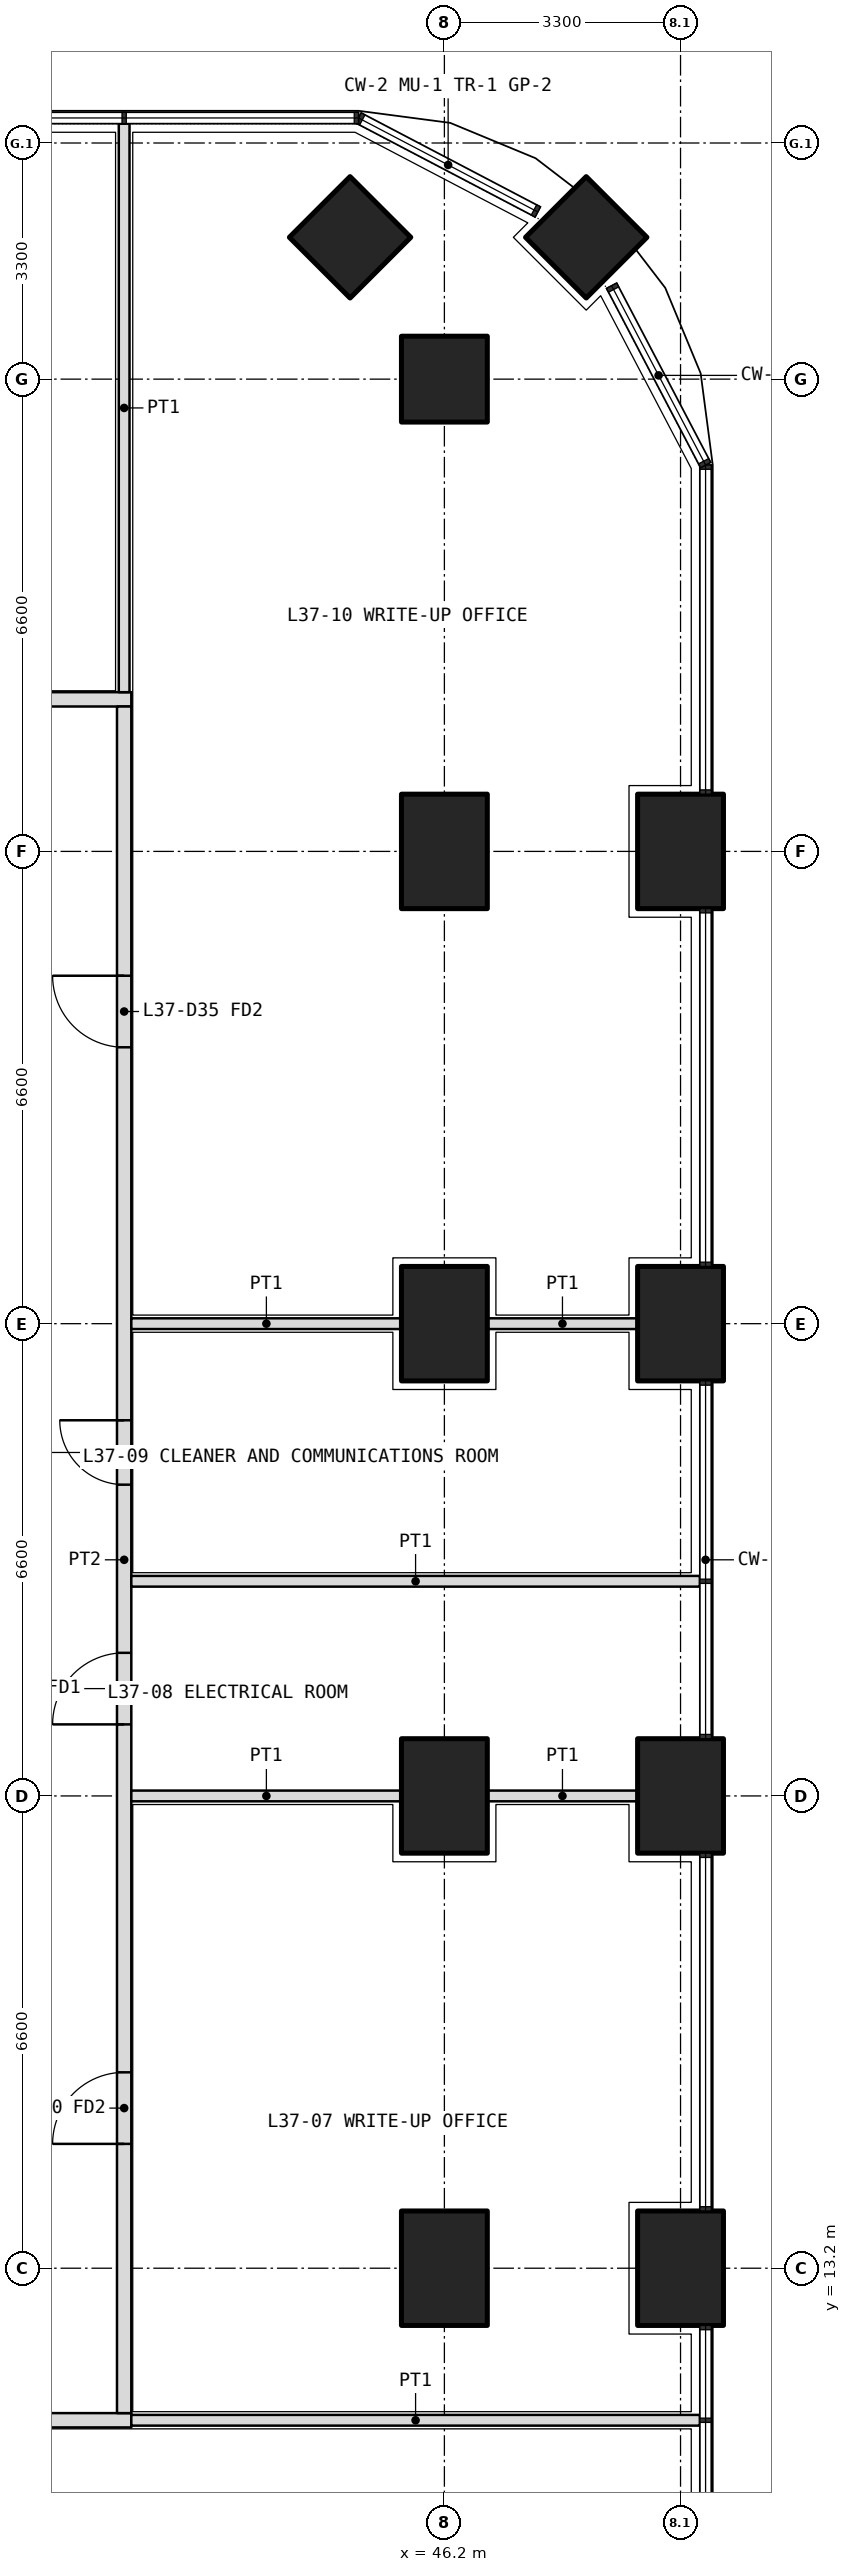
"""IFC4 building model, lengths in metres.
Left out: names, types, materials, properties, quantities, classifications, styles, units other than length and angle.
Written with IfcOpenShell. Run it as: python <this file> out.ifc"""

import sys

from ifc_helpers import new_model, si_unit, direction, frame, frame_2d, origin, origin_2d, place, context, subcontext, project, spatial, rectangle, extrude, element, fill, save


model = new_model("IFC4")
c1 = context("Model", 3, precision=1e-05, world=origin(), true_north=direction((0.0, 1.0)))
c2 = subcontext(c1, "Body", "Model", "MODEL_VIEW")
j1 = project(units=[si_unit("LENGTHUNIT", "METRE"), si_unit("PLANEANGLEUNIT", "RADIAN")], contexts=[c1])
p1 = place(None, origin())
s1 = spatial("IfcSite", under=j1, at=p1, CompositionType="ELEMENT")
p2 = place(p1, origin())
s2 = spatial("IfcBuilding", under=s1, at=p2, CompositionType="ELEMENT")
p3 = place(p2, frame((0.0, 0.0, 164.1)))
s3 = spatial("IfcBuildingStorey", under=s2, at=p3, CompositionType="ELEMENT", Elevation=164.1)
p4 = place(p3, frame((48.182, 41.582, 0.0), z_axis=(0.0, 0.0, 1.0), x_axis=(0.707106781187, 0.707106781187, 0.0)))
e1 = element("IfcColumn", 1, at=p4, inside=s3, PredefinedType="COLUMN", context=c2, shape_type="SweptSolid", body=[
    extrude(rectangle(XDim=1.2, YDim=1.2, at=origin_2d()), origin(), (0.0, 0.0, 1.0), 4.2),
])
for number, where, z_axis, x_axis in (
    (2, (49.5, 13.2, 0.0), (0.0, 0.0, 1.0), (0.0, 1.0, 0.0)),
    (3, (49.5, 19.8, 0.0), (0.0, 0.0, 1.0), (0.0, 1.0, 0.0)),
    (4, (49.5, 26.4, 0.0), (0.0, 0.0, 1.0), (0.0, 1.0, 0.0)),
    (5, (49.5, 33.0, 0.0), (0.0, 0.0, 1.0), (0.0, 1.0, 0.0)),
):
    element("IfcColumn", number, at=place(p3, frame(where, z_axis=z_axis, x_axis=x_axis)), inside=s3, PredefinedType="COLUMN", context=c2, shape_type="SweptSolid", body=[
        extrude(rectangle(XDim=1.6, YDim=1.2, at=origin_2d()), origin(), (0.0, 0.0, 1.0), 4.2),
    ])
for number, where, z_axis, x_axis in (
    (6, (46.2, 39.6, 0.0), (0.0, 0.0, 1.0), (1.0, 0.0, 0.0)),
    (7, (44.882, 41.582, 0.0), (0.0, 0.0, 1.0), (0.707, 0.707, 0.0)),
):
    element("IfcColumn", number, at=place(p3, frame(where, z_axis=z_axis, x_axis=x_axis)), inside=s3, PredefinedType="COLUMN", context=c2, shape_type="SweptSolid", body=[
        extrude(rectangle(XDim=1.2, YDim=1.2, at=origin_2d()), origin(), (0.0, 0.0, 1.0), 4.2),
    ])
for number, where, z_axis, x_axis in (
    (8, (46.2, 13.2, 0.0), (0.0, 0.0, 1.0), (0.0, 1.0, 0.0)),
    (9, (46.2, 19.8, 0.0), (0.0, 0.0, 1.0), (0.0, 1.0, 0.0)),
    (10, (46.2, 26.4, 0.0), (0.0, 0.0, 1.0), (0.0, 1.0, 0.0)),
    (11, (46.2, 33.0, 0.0), (0.0, 0.0, 1.0), (0.0, 1.0, 0.0)),
):
    element("IfcColumn", number, at=place(p3, frame(where, z_axis=z_axis, x_axis=x_axis)), inside=s3, PredefinedType="COLUMN", context=c2, shape_type="SweptSolid", body=[
        extrude(rectangle(XDim=1.6, YDim=1.2, at=origin_2d()), origin(), (0.0, 0.0, 1.0), 4.2),
    ])
p5 = place(p3, frame((16.5, 11.075, 0.0), z_axis=(0.0, 0.0, 1.0), x_axis=(1.0, 0.0, 0.0)))
e12 = element("IfcWall", 12, at=p5, inside=s3, PredefinedType="PARTITIONING", context=c2, shape_type="SweptSolid", body=[
    extrude(rectangle(XDim=25.325, YDim=0.2, at=frame_2d((12.663, 0.0))), origin(), (0.0, 0.0, 1.0), 2.85),
])
p6 = place(p5, frame((1.6, 0.0, 0.0)))
e13 = element("IfcOpeningElement", 13, at=p6, cuts=e12, PredefinedType="OPENING", context=c2, shape_type="SweptSolid", body=[
    extrude(rectangle(XDim=1.0, YDim=2.1, at=frame_2d((0.5, 1.05))), frame((0.0, 0.11, 0.0), z_axis=(0.0, -1.0, 0.0), x_axis=(1.0, 0.0, 0.0)), (0.0, 0.0, 1.0), 0.22),
])
p7 = place(p5, frame((4.9, 0.0, 0.0)))
e14 = element("IfcOpeningElement", 14, at=p7, cuts=e12, PredefinedType="OPENING", context=c2, shape_type="SweptSolid", body=[
    extrude(rectangle(XDim=1.0, YDim=2.1, at=frame_2d((0.5, 1.05))), frame((0.0, 0.11, 0.0), z_axis=(0.0, -1.0, 0.0), x_axis=(1.0, 0.0, 0.0)), (0.0, 0.0, 1.0), 0.22),
])
p8 = place(p5, frame((7.65, 0.0, 0.0)))
e15 = element("IfcOpeningElement", 15, at=p8, cuts=e12, PredefinedType="OPENING", context=c2, shape_type="SweptSolid", body=[
    extrude(rectangle(XDim=1.2, YDim=2.1, at=frame_2d((0.6, 1.05))), frame((0.0, 0.11, 0.0), z_axis=(0.0, -1.0, 0.0), x_axis=(1.0, 0.0, 0.0)), (0.0, 0.0, 1.0), 0.22),
])
p9 = place(p5, frame((16.962, 0.0, 0.0)))
e16 = element("IfcOpeningElement", 16, at=p9, cuts=e12, PredefinedType="OPENING", context=c2, shape_type="SweptSolid", body=[
    extrude(rectangle(XDim=1.2, YDim=2.1, at=frame_2d((0.6, 1.05))), frame((0.0, 0.11, 0.0), z_axis=(0.0, -1.0, 0.0), x_axis=(1.0, 0.0, 0.0)), (0.0, 0.0, 1.0), 0.22),
])
p10 = place(p3, frame((10.975, 35.125, 0.0), z_axis=(0.0, 0.0, 1.0), x_axis=(1.0, 0.0, 0.0)))
e17 = element("IfcWall", 17, at=p10, inside=s3, PredefinedType="PARTITIONING", context=c2, shape_type="SweptSolid", body=[
    extrude(rectangle(XDim=30.85, YDim=0.2, at=frame_2d((15.425, 0.0))), origin(), (0.0, 0.0, 1.0), 2.85),
])
p11 = place(p10, frame((0.663, 0.0, 0.0)))
e18 = element("IfcOpeningElement", 18, at=p11, cuts=e17, PredefinedType="OPENING", context=c2, shape_type="SweptSolid", body=[
    extrude(rectangle(XDim=1.0, YDim=2.1, at=frame_2d((0.5, 1.05))), frame((0.0, 0.11, 0.0), z_axis=(0.0, -1.0, 0.0), x_axis=(1.0, 0.0, 0.0)), (0.0, 0.0, 1.0), 0.22),
])
p12 = place(p10, frame((3.275, 0.0, 0.0)))
e19 = element("IfcOpeningElement", 19, at=p12, cuts=e17, PredefinedType="OPENING", context=c2, shape_type="SweptSolid", body=[
    extrude(rectangle(XDim=1.2, YDim=2.1, at=frame_2d((0.6, 1.05))), frame((0.0, 0.11, 0.0), z_axis=(0.0, -1.0, 0.0), x_axis=(1.0, 0.0, 0.0)), (0.0, 0.0, 1.0), 0.22),
])
p13 = place(p10, frame((11.625, 0.0, 0.0)))
e20 = element("IfcOpeningElement", 20, at=p13, cuts=e17, PredefinedType="OPENING", context=c2, shape_type="SweptSolid", body=[
    extrude(rectangle(XDim=1.0, YDim=2.1, at=frame_2d((0.5, 1.05))), frame((0.0, 0.11, 0.0), z_axis=(0.0, -1.0, 0.0), x_axis=(1.0, 0.0, 0.0)), (0.0, 0.0, 1.0), 0.22),
])
p14 = place(p10, frame((24.137, 0.0, 0.0)))
e21 = element("IfcOpeningElement", 21, at=p14, cuts=e17, PredefinedType="OPENING", context=c2, shape_type="SweptSolid", body=[
    extrude(rectangle(XDim=1.2, YDim=2.1, at=frame_2d((0.6, 1.05))), frame((0.0, 0.11, 0.0), z_axis=(0.0, -1.0, 0.0), x_axis=(1.0, 0.0, 0.0)), (0.0, 0.0, 1.0), 0.22),
])
p15 = place(p3, frame((41.725, 11.175, 0.0), z_axis=(0.0, 0.0, 1.0), x_axis=(0.0, 1.0, 0.0)))
e22 = element("IfcWall", 22, at=p15, inside=s3, PredefinedType="PARTITIONING", context=c2, shape_type="SweptSolid", body=[
    extrude(rectangle(XDim=23.85, YDim=0.2, at=frame_2d((11.925, 0.0))), origin(), (0.0, 0.0, 1.0), 2.85),
])
p16 = place(p15, frame((3.762, 0.0, 0.0)))
e23 = element("IfcOpeningElement", 23, at=p16, cuts=e22, PredefinedType="OPENING", context=c2, shape_type="SweptSolid", body=[
    extrude(rectangle(XDim=1.0, YDim=2.1, at=frame_2d((0.5, 1.05))), frame((0.0, 0.11, 0.0), z_axis=(0.0, -1.0, 0.0), x_axis=(1.0, 0.0, 0.0)), (0.0, 0.0, 1.0), 0.22),
])
p17 = place(p15, frame((9.625, 0.0, 0.0)))
e24 = element("IfcOpeningElement", 24, at=p17, cuts=e22, PredefinedType="OPENING", context=c2, shape_type="SweptSolid", body=[
    extrude(rectangle(XDim=1.0, YDim=2.1, at=frame_2d((0.5, 1.05))), frame((0.0, 0.11, 0.0), z_axis=(0.0, -1.0, 0.0), x_axis=(1.0, 0.0, 0.0)), (0.0, 0.0, 1.0), 0.22),
])
p18 = place(p15, frame((12.975, 0.0, 0.0)))
e25 = element("IfcOpeningElement", 25, at=p18, cuts=e22, PredefinedType="OPENING", context=c2, shape_type="SweptSolid", body=[
    extrude(rectangle(XDim=0.9, YDim=2.1, at=frame_2d((0.45, 1.05))), frame((0.0, 0.11, 0.0), z_axis=(0.0, -1.0, 0.0), x_axis=(1.0, 0.0, 0.0)), (0.0, 0.0, 1.0), 0.22),
])
p19 = place(p15, frame((19.087, 0.0, 0.0)))
e26 = element("IfcOpeningElement", 26, at=p19, cuts=e22, PredefinedType="OPENING", context=c2, shape_type="SweptSolid", body=[
    extrude(rectangle(XDim=1.0, YDim=2.1, at=frame_2d((0.5, 1.05))), frame((0.0, 0.11, 0.0), z_axis=(0.0, -1.0, 0.0), x_axis=(1.0, 0.0, 0.0)), (0.0, 0.0, 1.0), 0.22),
])
p20 = place(p3, frame((49.77, 11.075, 0.0), z_axis=(0.0, 0.0, 1.0), x_axis=(-1.0, 0.0, 0.0)))
e27 = element("IfcWall", 27, at=p20, inside=s3, PredefinedType="PARTITIONING", context=c2, shape_type="SweptSolid", body=[
    extrude(rectangle(XDim=7.945, YDim=0.15, at=frame_2d((3.973, 0.0))), origin(), (0.0, 0.0, 1.0), 2.7),
])
p21 = place(p3, frame((41.725, 43.17, 0.0), z_axis=(0.0, 0.0, 1.0), x_axis=(0.0, -1.0, 0.0)))
e28 = element("IfcWall", 28, at=p21, inside=s3, PredefinedType="PARTITIONING", context=c2, shape_type="SweptSolid", body=[
    extrude(rectangle(XDim=7.945, YDim=0.15, at=frame_2d((3.972, 0.0))), origin(), (0.0, 0.0, 1.0), 2.7),
])
p22 = place(p3, frame((49.77, 22.8, 0.0), z_axis=(0.0, 0.0, 1.0), x_axis=(-1.0, 0.0, 0.0)))
e29 = element("IfcWall", 29, at=p22, inside=s3, PredefinedType="PARTITIONING", context=c2, shape_type="SweptSolid", body=[
    extrude(rectangle(XDim=7.945, YDim=0.15, at=frame_2d((3.973, 0.0))), origin(), (0.0, 0.0, 1.0), 2.7),
])
p23 = place(p3, frame((48.9, 26.4, 0.0), z_axis=(0.0, 0.0, 1.0), x_axis=(-1.0, 0.0, 0.0)))
e30 = element("IfcWall", 30, at=p23, inside=s3, PredefinedType="PARTITIONING", context=c2, shape_type="SweptSolid", body=[
    extrude(rectangle(XDim=2.1, YDim=0.15, at=frame_2d((1.05, 0.0))), origin(), (0.0, 0.0, 1.0), 2.85),
])
p24 = place(p3, frame((45.6, 26.4, 0.0), z_axis=(0.0, 0.0, 1.0), x_axis=(-1.0, 0.0, 0.0)))
e31 = element("IfcWall", 31, at=p24, inside=s3, PredefinedType="PARTITIONING", context=c2, shape_type="SweptSolid", body=[
    extrude(rectangle(XDim=3.775, YDim=0.15, at=frame_2d((1.888, 0.0))), origin(), (0.0, 0.0, 1.0), 2.85),
])
p25 = place(p3, frame((48.9, 19.8, 0.0), z_axis=(0.0, 0.0, 1.0), x_axis=(-1.0, 0.0, 0.0)))
e32 = element("IfcWall", 32, at=p25, inside=s3, PredefinedType="PARTITIONING", context=c2, shape_type="SweptSolid", body=[
    extrude(rectangle(XDim=2.1, YDim=0.15, at=frame_2d((1.05, 0.0))), origin(), (0.0, 0.0, 1.0), 2.85),
])
p26 = place(p3, frame((45.6, 19.8, 0.0), z_axis=(0.0, 0.0, 1.0), x_axis=(-1.0, 0.0, 0.0)))
e33 = element("IfcWall", 33, at=p26, inside=s3, PredefinedType="PARTITIONING", context=c2, shape_type="SweptSolid", body=[
    extrude(rectangle(XDim=3.775, YDim=0.15, at=frame_2d((1.888, 0.0))), origin(), (0.0, 0.0, 1.0), 2.85),
])
p27 = place(p16, origin())
e34 = element("IfcDoor", 34, at=p27, inside=s3, OperationType="SINGLE_SWING_LEFT", PredefinedType="DOOR", context=c2, shape_type="SweptSolid", body=[
    extrude(rectangle(XDim=1.0, YDim=2.1, at=frame_2d((0.5, 1.05))), frame((0.0, 0.025, 0.0), z_axis=(0.0, -1.0, 0.0), x_axis=(1.0, 0.0, 0.0)), (0.0, 0.0, 1.0), 0.05),
])
fill(e23, e34)
p28 = place(p17, origin())
e35 = element("IfcDoor", 35, at=p28, inside=s3, OperationType="SINGLE_SWING_LEFT", PredefinedType="DOOR", context=c2, shape_type="SweptSolid", body=[
    extrude(rectangle(XDim=1.0, YDim=2.1, at=frame_2d((0.5, 1.05))), frame((0.0, 0.025, 0.0), z_axis=(0.0, -1.0, 0.0), x_axis=(1.0, 0.0, 0.0)), (0.0, 0.0, 1.0), 0.05),
])
fill(e24, e35)
p29 = place(p18, origin())
e36 = element("IfcDoor", 36, at=p29, inside=s3, OperationType="SINGLE_SWING_RIGHT", PredefinedType="DOOR", context=c2, shape_type="SweptSolid", body=[
    extrude(rectangle(XDim=0.9, YDim=2.1, at=frame_2d((0.45, 1.05))), frame((0.0, 0.025, 0.0), z_axis=(0.0, -1.0, 0.0), x_axis=(1.0, 0.0, 0.0)), (0.0, 0.0, 1.0), 0.05),
])
fill(e25, e36)
p30 = place(p19, origin())
e37 = element("IfcDoor", 37, at=p30, inside=s3, OperationType="SINGLE_SWING_RIGHT", PredefinedType="DOOR", context=c2, shape_type="SweptSolid", body=[
    extrude(rectangle(XDim=1.0, YDim=2.1, at=frame_2d((0.5, 1.05))), frame((0.0, 0.025, 0.0), z_axis=(0.0, -1.0, 0.0), x_axis=(1.0, 0.0, 0.0)), (0.0, 0.0, 1.0), 0.05),
])
fill(e26, e37)
save(model, sys.argv[1])
